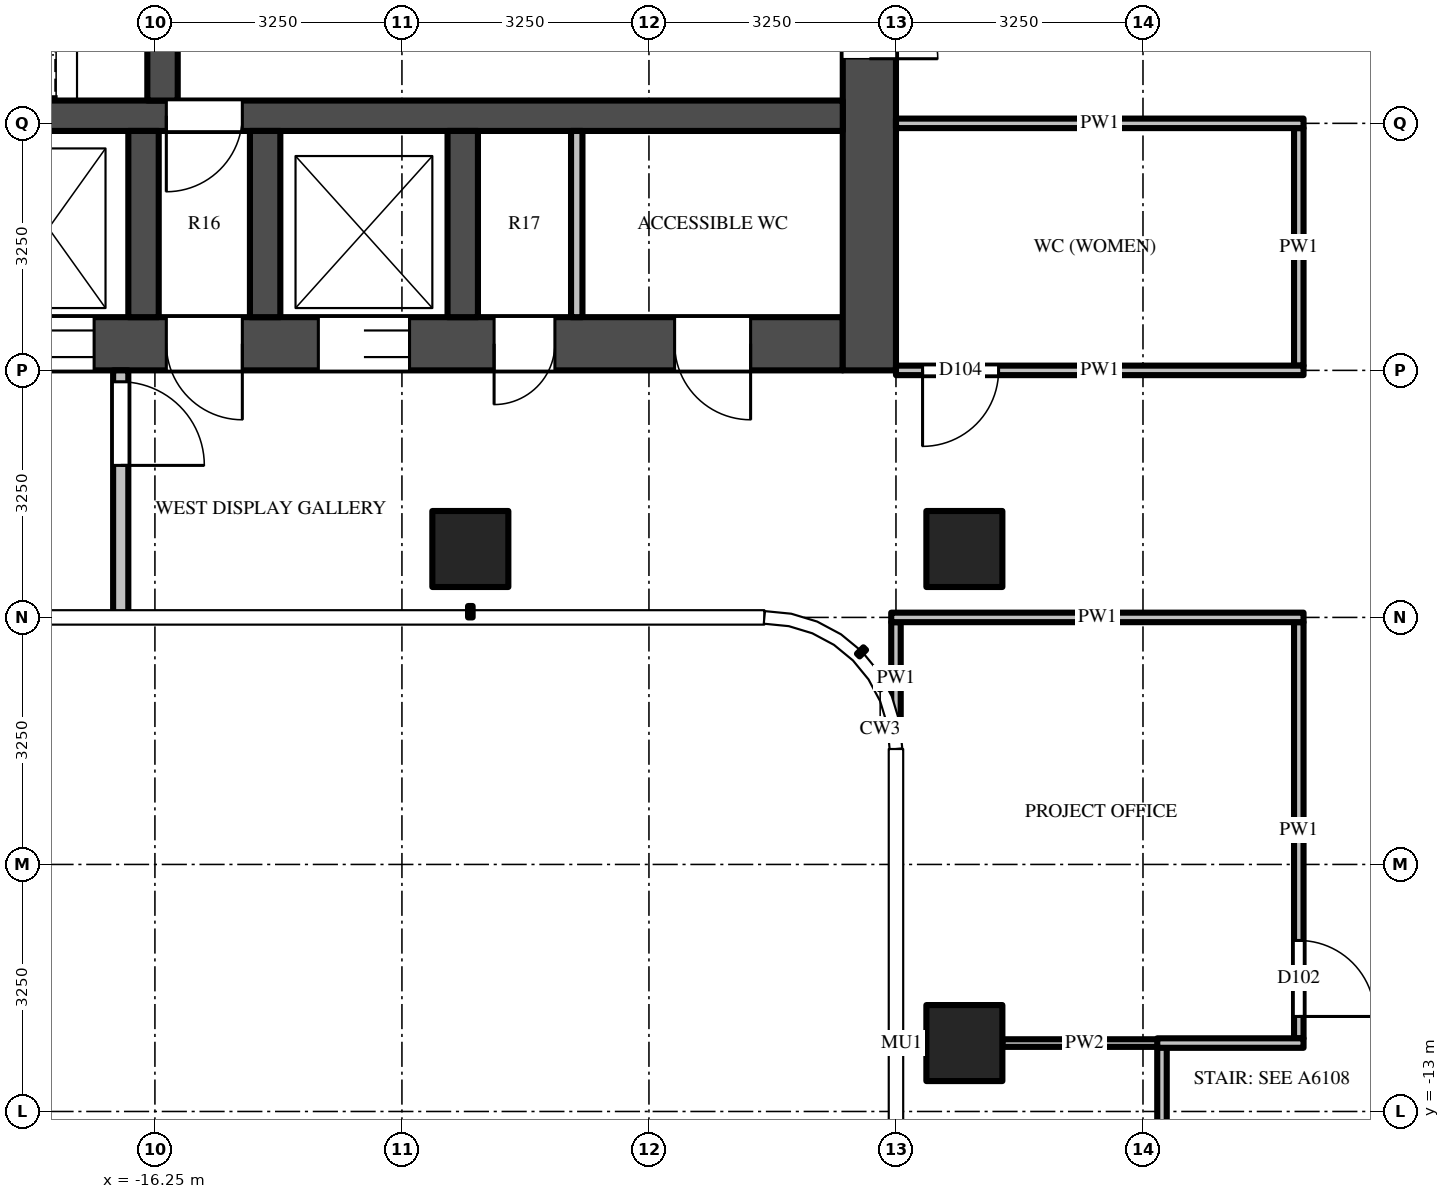
"""IFC4 building model, lengths in metres.
Left out: names, types, materials, properties, quantities, classifications, styles, units other than length and angle.
Written with IfcOpenShell. Run it as: python <this file> out.ifc"""

import sys

from ifc_helpers import new_model, si_unit, direction, frame, frame_2d, origin, origin_2d, place, context, subcontext, project, spatial, rectangle, extrude, source, transform, mapped, element, fill, save


model = new_model("IFC4")
c1 = context("Model", 3, precision=1e-05, world=origin(), true_north=direction((0.0, 1.0)))
c2 = subcontext(c1, "Body", "Model", "MODEL_VIEW")
j1 = project(units=[si_unit("LENGTHUNIT", "METRE"), si_unit("PLANEANGLEUNIT", "RADIAN")], contexts=[c1])
p1 = place(None, origin())
s1 = spatial("IfcSite", under=j1, at=p1, CompositionType="ELEMENT")
p2 = place(p1, origin())
s2 = spatial("IfcBuilding", under=s1, at=p2, CompositionType="ELEMENT")
p3 = place(p2, frame((0.0, 0.0, 326.2)))
s3 = spatial("IfcBuildingStorey", under=s2, at=p3, CompositionType="ELEMENT", Elevation=326.2)
m1 = source(origin(), c2, "Body", "SweptSolid", [
    extrude(rectangle(XDim=1.0, YDim=1.0, at=origin_2d()), origin(), (0.0, 0.0, 1.0), 3.9),
])
for number, where, z_axis, x_axis in (
    (1, (-5.6, -5.6, 0.0), (0.0, 0.0, 1.0), (1.0, 0.0, 0.0)),
    (2, (-5.6, -12.1, 0.0), (0.0, 0.0, 1.0), (1.0, 0.0, 0.0)),
    (3, (-12.1, -5.6, 0.0), (0.0, 0.0, 1.0), (1.0, 0.0, 0.0)),
):
    element("IfcColumn", number, at=place(p3, frame(where, z_axis=z_axis, x_axis=x_axis)), inside=s3, PredefinedType="COLUMN", context=c2, shape_type="MappedRepresentation", body=[
        mapped(m1, transform((0.0, 0.0, 0.0))),
    ])
m2 = source(origin(), c2, "Body", "SweptSolid", [
    extrude(rectangle(XDim=14.85, YDim=0.7, at=frame_2d((7.425, 0.0))), origin(), (0.0, 0.0, 1.0), 3.5),
])
p4 = place(p3, frame((-7.2, -2.9, 0.0), z_axis=(0.0, 0.0, 1.0), x_axis=(-1.0, 0.0, 0.0)))
e4 = element("IfcWall", 4, at=p4, inside=s3, PredefinedType="SHEAR", context=c2, shape_type="MappedRepresentation", body=[
    mapped(m2, transform((0.0, 0.0, 0.0))),
])
m3 = source(origin(), c2, "Body", "SweptSolid", [
    extrude(rectangle(XDim=1.2, YDim=2.1, at=frame_2d((0.6, 1.05))), frame((0.0, 0.36, 0.0), z_axis=(0.0, -1.0, 0.0), x_axis=(1.0, 0.0, 0.0)), (0.0, 0.0, 1.0), 0.72),
])
p5 = place(p4, frame((5.7, 0.0, 0.0)))
e5 = element("IfcOpeningElement", 5, at=p5, cuts=e4, PredefinedType="OPENING", context=c2, shape_type="MappedRepresentation", body=[
    mapped(m3, transform((0.0, 0.0, 0.0))),
])
m4 = source(origin(), c2, "Body", "SweptSolid", [
    extrude(rectangle(XDim=1.3, YDim=2.1, at=frame_2d((0.65, 1.05))), frame((0.0, 0.36, 0.0), z_axis=(0.0, -1.0, 0.0), x_axis=(1.0, 0.0, 0.0)), (0.0, 0.0, 1.0), 0.72),
])
p6 = place(p4, frame((12.2, 0.0, 0.0)))
e6 = element("IfcOpeningElement", 6, at=p6, cuts=e4, PredefinedType="OPENING", context=c2, shape_type="MappedRepresentation", body=[
    mapped(m4, transform((0.0, 0.0, 0.0))),
])
p7 = place(p4, frame((9.85, 0.0, 0.0)))
e7 = element("IfcOpeningElement", 7, at=p7, cuts=e4, PredefinedType="OPENING", context=c2, shape_type="MappedRepresentation", body=[
    mapped(m3, transform((0.0, 0.0, 0.0))),
])
m5 = source(origin(), c2, "Body", "SweptSolid", [
    extrude(rectangle(XDim=1.0, YDim=2.1, at=frame_2d((0.5, 1.05))), frame((0.0, 0.36, 0.0), z_axis=(0.0, -1.0, 0.0), x_axis=(1.0, 0.0, 0.0)), (0.0, 0.0, 1.0), 0.72),
])
p8 = place(p4, frame((7.9, 0.0, 0.0)))
e8 = element("IfcOpeningElement", 8, at=p8, cuts=e4, PredefinedType="OPENING", context=c2, shape_type="MappedRepresentation", body=[
    mapped(m5, transform((0.0, 0.0, 0.0))),
])
p9 = place(p4, frame((1.212, 0.0, 0.0)))
e9 = element("IfcOpeningElement", 9, at=p9, cuts=e4, PredefinedType="OPENING", context=c2, shape_type="MappedRepresentation", body=[
    mapped(m5, transform((0.0, 0.0, 0.0))),
])
m6 = source(origin(), c2, "Body", "SweptSolid", [
    extrude(rectangle(XDim=0.8, YDim=2.1, at=frame_2d((0.4, 1.05))), frame((0.0, 0.36, 0.0), z_axis=(0.0, -1.0, 0.0), x_axis=(1.0, 0.0, 0.0)), (0.0, 0.0, 1.0), 0.72),
])
p10 = place(p4, frame((3.788, 0.0, 0.0)))
e10 = element("IfcOpeningElement", 10, at=p10, cuts=e4, PredefinedType="OPENING", context=c2, shape_type="MappedRepresentation", body=[
    mapped(m6, transform((0.0, 0.0, 0.0))),
])
m7 = source(origin(), c2, "Body", "SweptSolid", [
    extrude(rectangle(XDim=9.05, YDim=0.7, at=frame_2d((4.525, 0.0))), origin(), (0.0, 0.0, 1.0), 3.5),
])
p11 = place(p3, frame((-6.85, 5.8, 0.0), z_axis=(0.0, 0.0, 1.0), x_axis=(0.0, -1.0, 0.0)))
e11 = element("IfcWall", 11, at=p11, inside=s3, PredefinedType="SHEAR", context=c2, shape_type="MappedRepresentation", body=[
    mapped(m7, transform((0.0, 0.0, 0.0))),
])
m8 = source(origin(), c2, "Body", "SweptSolid", [
    extrude(rectangle(XDim=1.8, YDim=2.1, at=frame_2d((0.9, 1.05))), frame((0.0, 0.36, 0.0), z_axis=(0.0, -1.0, 0.0), x_axis=(1.0, 0.0, 0.0)), (0.0, 0.0, 1.0), 0.72),
])
p12 = place(p11, frame((3.15, 0.0, 0.0)))
e12 = element("IfcOpeningElement", 12, at=p12, cuts=e11, PredefinedType="OPENING", context=c2, shape_type="MappedRepresentation", body=[
    mapped(m8, transform((0.0, 0.0, 0.0))),
])
m9 = source(origin(), c2, "Body", "SweptSolid", [
    extrude(rectangle(XDim=14.85, YDim=0.4, at=frame_2d((7.425, 0.0))), origin(), (0.0, 0.0, 1.0), 3.5),
])
p13 = place(p3, frame((-7.2, 0.1, 0.0), z_axis=(0.0, 0.0, 1.0), x_axis=(-1.0, 0.0, 0.0)))
e13 = element("IfcWall", 13, at=p13, inside=s3, PredefinedType="SHEAR", context=c2, shape_type="MappedRepresentation", body=[
    mapped(m9, transform((0.0, 0.0, 0.0))),
])
m10 = source(origin(), c2, "Body", "SweptSolid", [
    extrude(rectangle(XDim=1.0, YDim=2.1, at=frame_2d((0.5, 1.05))), frame((0.0, 0.21, 0.0), z_axis=(0.0, -1.0, 0.0), x_axis=(1.0, 0.0, 0.0)), (0.0, 0.0, 1.0), 0.42),
])
p14 = place(p13, frame((7.9, 0.0, 0.0)))
e14 = element("IfcOpeningElement", 14, at=p14, cuts=e13, PredefinedType="OPENING", context=c2, shape_type="MappedRepresentation", body=[
    mapped(m10, transform((0.0, 0.0, 0.0))),
])
m11 = source(origin(), c2, "Body", "SweptSolid", [
    extrude(rectangle(XDim=5.5, YDim=0.4, at=frame_2d((2.75, 0.0))), origin(), (0.0, 0.0, 1.0), 3.5),
])
p15 = place(p3, frame((-16.15, 5.8, 0.0), z_axis=(0.0, 0.0, 1.0), x_axis=(0.0, -1.0, 0.0)))
e15 = element("IfcWall", 15, at=p15, inside=s3, PredefinedType="SHEAR", context=c2, shape_type="MappedRepresentation", body=[
    mapped(m11, transform((0.0, 0.0, 0.0))),
])
m12 = source(origin(), c2, "Body", "SweptSolid", [
    extrude(rectangle(XDim=1.1, YDim=2.1, at=frame_2d((0.55, 1.05))), frame((0.0, 0.21, 0.0), z_axis=(0.0, -1.0, 0.0), x_axis=(1.0, 0.0, 0.0)), (0.0, 0.0, 1.0), 0.42),
])
p16 = place(p15, frame((0.725, 0.0, 0.0)))
e16 = element("IfcOpeningElement", 16, at=p16, cuts=e15, PredefinedType="OPENING", context=c2, shape_type="MappedRepresentation", body=[
    mapped(m12, transform((0.0, 0.0, 0.0))),
])
p17 = place(p15, frame((3.675, 0.0, 0.0)))
e17 = element("IfcOpeningElement", 17, at=p17, cuts=e15, PredefinedType="OPENING", context=c2, shape_type="MappedRepresentation", body=[
    mapped(m12, transform((0.0, 0.0, 0.0))),
])
m13 = source(origin(), c2, "Body", "SweptSolid", [
    extrude(rectangle(XDim=2.45, YDim=0.4, at=frame_2d((1.225, 0.0))), origin(), (0.0, 0.0, 1.0), 3.5),
])
for number, where, z_axis, x_axis in (
    (18, (-12.2, -0.1, 0.0), (0.0, 0.0, 1.0), (0.0, -1.0, 0.0)),
    (19, (-14.8, -0.1, 0.0), (0.0, 0.0, 1.0), (0.0, -1.0, 0.0)),
    (20, (-16.4, -0.1, 0.0), (0.0, 0.0, 1.0), (0.0, -1.0, 0.0)),
):
    element("IfcWall", number, at=place(p3, frame(where, z_axis=z_axis, x_axis=x_axis)), inside=s3, PredefinedType="SHEAR", context=c2, shape_type="MappedRepresentation", body=[
        mapped(m13, transform((0.0, 0.0, 0.0))),
    ])
m14 = source(origin(), c2, "Body", "SweptSolid", [
    extrude(rectangle(XDim=3.25, YDim=0.2, at=frame_2d((1.625, 0.0))), origin(), (0.0, 0.0, 1.0), 3.5),
])
p18 = place(p3, frame((-16.7, -3.25, 0.0), z_axis=(0.0, 0.0, 1.0), x_axis=(0.0, -1.0, 0.0)))
e21 = element("IfcWall", 21, at=p18, inside=s3, PredefinedType="PARTITIONING", context=c2, shape_type="MappedRepresentation", body=[
    mapped(m14, transform((0.0, 0.0, 0.0))),
])
m15 = source(origin(), c2, "Body", "SweptSolid", [
    extrude(rectangle(XDim=1.1, YDim=2.1, at=frame_2d((0.55, 1.05))), frame((0.0, 0.11, 0.0), z_axis=(0.0, -1.0, 0.0), x_axis=(1.0, 0.0, 0.0)), (0.0, 0.0, 1.0), 0.22),
])
p19 = place(p18, frame((0.15, 0.0, 0.0)))
e22 = element("IfcOpeningElement", 22, at=p19, cuts=e21, PredefinedType="OPENING", context=c2, shape_type="MappedRepresentation", body=[
    mapped(m15, transform((0.0, 0.0, 0.0))),
])
m16 = source(origin(), c2, "Body", "SweptSolid", [
    extrude(rectangle(XDim=2.45, YDim=0.15, at=frame_2d((1.225, 0.0))), origin(), (0.0, 0.0, 1.0), 3.5),
])
p20 = place(p3, frame((-10.7, -0.1, 0.0), z_axis=(0.0, 0.0, 1.0), x_axis=(0.0, -1.0, 0.0)))
e23 = element("IfcWall", 23, at=p20, inside=s3, PredefinedType="PARTITIONING", context=c2, shape_type="MappedRepresentation", body=[
    mapped(m16, transform((0.0, 0.0, 0.0))),
])
m17 = source(origin(), c2, "Body", "SweptSolid", [
    extrude(rectangle(XDim=1.469, YDim=0.125, at=frame_2d((0.734, 0.0))), origin(), (0.0, 0.0, 1.0), 3.5),
])
p21 = place(p3, frame((-6.5, -6.562, 0.0), z_axis=(0.0, 0.0, 1.0), x_axis=(0.0, -1.0, 0.0)))
e24 = element("IfcWall", 24, at=p21, inside=s3, PredefinedType="PARTITIONING", context=c2, shape_type="MappedRepresentation", body=[
    mapped(m17, transform((0.0, 0.0, 0.0))),
])
m18 = source(origin(), c2, "Body", "SweptSolid", [
    extrude(rectangle(XDim=8.788, YDim=0.125, at=frame_2d((4.394, 0.0))), origin(), (0.0, 0.0, 1.0), 2.58),
])
p22 = place(p3, frame((-3.0, -20.938, 0.0), z_axis=(0.0, 0.0, 1.0), x_axis=(0.0, 1.0, 0.0)))
e25 = element("IfcWall", 25, at=p22, inside=s3, PredefinedType="PARTITIONING", context=c2, shape_type="MappedRepresentation", body=[
    mapped(m18, transform((0.0, 0.0, 0.0))),
])
m19 = source(origin(), c2, "Body", "SweptSolid", [
    extrude(rectangle(XDim=1.8, YDim=2.1, at=frame_2d((0.9, 1.05))), frame((0.0, 0.073, 0.0), z_axis=(0.0, -1.0, 0.0), x_axis=(1.0, 0.0, 0.0)), (0.0, 0.0, 1.0), 0.145),
])
p23 = place(p22, frame((5.288, 0.0, 0.0)))
e26 = element("IfcOpeningElement", 26, at=p23, cuts=e25, PredefinedType="OPENING", context=c2, shape_type="MappedRepresentation", body=[
    mapped(m19, transform((0.0, 0.0, 0.0))),
])
m20 = source(origin(), c2, "Body", "SweptSolid", [
    extrude(rectangle(XDim=5.475, YDim=0.125, at=frame_2d((2.738, 0.0))), origin(), (0.0, 0.0, 1.0), 2.718),
])
p24 = place(p3, frame((-1.2, -6.562, 0.0), z_axis=(0.0, 0.0, 1.0), x_axis=(0.0, -1.0, 0.0)))
e27 = element("IfcWall", 27, at=p24, inside=s3, PredefinedType="PARTITIONING", context=c2, shape_type="MappedRepresentation", body=[
    mapped(m20, transform((0.0, 0.0, 0.0))),
])
m21 = source(origin(), c2, "Body", "SweptSolid", [
    extrude(rectangle(XDim=1.0, YDim=2.1, at=frame_2d((0.5, 1.05))), frame((0.0, 0.073, 0.0), z_axis=(0.0, -1.0, 0.0), x_axis=(1.0, 0.0, 0.0)), (0.0, 0.0, 1.0), 0.145),
])
p25 = place(p24, frame((4.188, 0.0, 0.0)))
e28 = element("IfcOpeningElement", 28, at=p25, cuts=e27, PredefinedType="OPENING", context=c2, shape_type="MappedRepresentation", body=[
    mapped(m21, transform((0.0, 0.0, 0.0))),
])
m22 = source(origin(), c2, "Body", "SweptSolid", [
    extrude(rectangle(XDim=3.125, YDim=0.125, at=frame_2d((1.562, 0.0))), origin(), (0.0, 0.0, 1.0), 2.797),
])
p26 = place(p3, frame((-1.2, -0.062, 0.0), z_axis=(0.0, 0.0, 1.0), x_axis=(0.0, -1.0, 0.0)))
e29 = element("IfcWall", 29, at=p26, inside=s3, PredefinedType="PARTITIONING", context=c2, shape_type="MappedRepresentation", body=[
    mapped(m22, transform((0.0, 0.0, 0.0))),
])
m23 = source(origin(), c2, "Body", "SweptSolid", [
    extrude(rectangle(XDim=2.163, YDim=0.1, at=frame_2d((1.081, 0.0))), origin(), (0.0, 0.0, 1.0), 2.718),
])
p27 = place(p3, frame((-5.1, -12.1, 0.0), z_axis=(0.0, 0.0, 1.0), x_axis=(1.0, 0.0, 0.0)))
e30 = element("IfcWall", 30, at=p27, inside=s3, PredefinedType="PARTITIONING", context=c2, shape_type="MappedRepresentation", body=[
    mapped(m23, transform((0.0, 0.0, 0.0))),
])
m24 = source(origin(), c2, "Body", "SweptSolid", [
    extrude(rectangle(XDim=1.925, YDim=0.125, at=frame_2d((0.962, 0.0))), origin(), (0.0, 0.0, 1.0), 2.718),
])
p28 = place(p3, frame((-3.062, -12.1, 0.0), z_axis=(0.0, 0.0, 1.0), x_axis=(1.0, 0.0, 0.0)))
e31 = element("IfcWall", 31, at=p28, inside=s3, PredefinedType="PARTITIONING", context=c2, shape_type="MappedRepresentation", body=[
    mapped(m24, transform((0.0, 0.0, 0.0))),
])
m25 = source(origin(), c2, "Body", "SweptSolid", [
    extrude(rectangle(XDim=5.425, YDim=0.125, at=frame_2d((2.712, 0.0))), origin(), (0.0, 0.0, 1.0), 2.58),
])
p29 = place(p3, frame((-1.137, -6.5, 0.0), z_axis=(0.0, 0.0, 1.0), x_axis=(-1.0, 0.0, 0.0)))
e32 = element("IfcWall", 32, at=p29, inside=s3, PredefinedType="PARTITIONING", context=c2, shape_type="MappedRepresentation", body=[
    mapped(m25, transform((0.0, 0.0, 0.0))),
])
m26 = source(origin(), c2, "Body", "SweptSolid", [
    extrude(rectangle(XDim=5.363, YDim=0.125, at=frame_2d((2.681, 0.0))), origin(), (0.0, 0.0, 1.0), 2.718),
])
p30 = place(p3, frame((-1.137, -3.25, 0.0), z_axis=(0.0, 0.0, 1.0), x_axis=(-1.0, 0.0, 0.0)))
e33 = element("IfcWall", 33, at=p30, inside=s3, PredefinedType="PARTITIONING", context=c2, shape_type="MappedRepresentation", body=[
    mapped(m26, transform((0.0, 0.0, 0.0))),
])
p31 = place(p30, frame((4.012, 0.0, 0.0)))
e34 = element("IfcOpeningElement", 34, at=p31, cuts=e33, PredefinedType="OPENING", context=c2, shape_type="MappedRepresentation", body=[
    mapped(m21, transform((0.0, 0.0, 0.0))),
])
p32 = place(p3, frame((-1.137, 0.0, 0.0), z_axis=(0.0, 0.0, 1.0), x_axis=(-1.0, 0.0, 0.0)))
e35 = element("IfcWall", 35, at=p32, inside=s3, PredefinedType="PARTITIONING", context=c2, shape_type="MappedRepresentation", body=[
    mapped(m26, transform((0.0, 0.0, 0.0))),
])
m27 = source(origin(), c2, "Body", "SweptSolid", [
    extrude(rectangle(XDim=1.2, YDim=2.1, at=frame_2d((0.6, 1.05))), frame((0.0, -0.275, 0.0), z_axis=(0.0, -1.0, 0.0), x_axis=(1.0, 0.0, 0.0)), (0.0, 0.0, 1.0), 0.05),
])
p33 = place(p5, origin())
e36 = element("IfcDoor", 36, at=p33, inside=s3, OperationType="DOUBLE_DOOR_SLIDING", PredefinedType="DOOR", context=c2, shape_type="MappedRepresentation", body=[
    mapped(m27, transform((0.0, 0.0, 0.0))),
])
fill(e5, e36)
p34 = place(p7, origin())
e37 = element("IfcDoor", 37, at=p34, inside=s3, OperationType="DOUBLE_DOOR_SLIDING", PredefinedType="DOOR", context=c2, shape_type="MappedRepresentation", body=[
    mapped(m27, transform((0.0, 0.0, 0.0))),
])
fill(e7, e37)
m28 = source(origin(), c2, "Body", "SweptSolid", [
    extrude(rectangle(XDim=1.8, YDim=2.1, at=frame_2d((0.9, 1.05))), frame((0.0, -0.275, 0.0), z_axis=(0.0, -1.0, 0.0), x_axis=(1.0, 0.0, 0.0)), (0.0, 0.0, 1.0), 0.05),
])
p35 = place(p12, origin())
e38 = element("IfcDoor", 38, at=p35, inside=s3, OperationType="DOUBLE_DOOR_SINGLE_SWING", PredefinedType="DOOR", context=c2, shape_type="MappedRepresentation", body=[
    mapped(m28, transform((0.0, 0.0, 0.0))),
])
fill(e12, e38)
m29 = source(origin(), c2, "Body", "SweptSolid", [
    extrude(rectangle(XDim=1.0, YDim=2.1, at=frame_2d((0.5, 1.05))), frame((0.0, 0.025, 0.0), z_axis=(0.0, -1.0, 0.0), x_axis=(1.0, 0.0, 0.0)), (0.0, 0.0, 1.0), 0.05),
])
p36 = place(p14, origin())
e39 = element("IfcDoor", 39, at=p36, inside=s3, OperationType="SINGLE_SWING_RIGHT", PredefinedType="DOOR", context=c2, shape_type="MappedRepresentation", body=[
    mapped(m29, transform((0.0, 0.0, 0.0))),
])
fill(e14, e39)
m30 = source(origin(), c2, "Body", "SweptSolid", [
    extrude(rectangle(XDim=1.0, YDim=2.1, at=frame_2d((0.5, 1.05))), frame((0.0, -0.275, 0.0), z_axis=(0.0, -1.0, 0.0), x_axis=(1.0, 0.0, 0.0)), (0.0, 0.0, 1.0), 0.05),
])
p37 = place(p8, origin())
e40 = element("IfcDoor", 40, at=p37, inside=s3, OperationType="SINGLE_SWING_LEFT", PredefinedType="DOOR", context=c2, shape_type="MappedRepresentation", body=[
    mapped(m30, transform((0.0, 0.0, 0.0))),
])
fill(e8, e40)
m31 = source(origin(), c2, "Body", "SweptSolid", [
    extrude(rectangle(XDim=1.1, YDim=2.1, at=frame_2d((0.55, 1.05))), frame((0.0, 0.025, 0.0), z_axis=(0.0, -1.0, 0.0), x_axis=(1.0, 0.0, 0.0)), (0.0, 0.0, 1.0), 0.05),
])
p38 = place(p19, origin())
e41 = element("IfcDoor", 41, at=p38, inside=s3, OperationType="SINGLE_SWING_RIGHT", PredefinedType="DOOR", context=c2, shape_type="MappedRepresentation", body=[
    mapped(m31, transform((0.0, 0.0, 0.0))),
])
fill(e22, e41)
p39 = place(p9, origin())
e42 = element("IfcDoor", 42, at=p39, inside=s3, OperationType="SINGLE_SWING_LEFT", PredefinedType="DOOR", context=c2, shape_type="MappedRepresentation", body=[
    mapped(m30, transform((0.0, 0.0, 0.0))),
])
fill(e9, e42)
m32 = source(origin(), c2, "Body", "SweptSolid", [
    extrude(rectangle(XDim=0.8, YDim=2.1, at=frame_2d((0.4, 1.05))), frame((0.0, -0.275, 0.0), z_axis=(0.0, -1.0, 0.0), x_axis=(1.0, 0.0, 0.0)), (0.0, 0.0, 1.0), 0.05),
])
p40 = place(p10, origin())
e43 = element("IfcDoor", 43, at=p40, inside=s3, OperationType="SINGLE_SWING_RIGHT", PredefinedType="DOOR", context=c2, shape_type="MappedRepresentation", body=[
    mapped(m32, transform((0.0, 0.0, 0.0))),
])
fill(e10, e43)
p41 = place(p25, origin())
e44 = element("IfcDoor", 44, at=p41, inside=s3, OperationType="SINGLE_SWING_RIGHT", PredefinedType="DOOR", context=c2, shape_type="MappedRepresentation", body=[
    mapped(m29, transform((0.0, 0.0, 0.0))),
])
fill(e28, e44)
p42 = place(p31, origin())
e45 = element("IfcDoor", 45, at=p42, inside=s3, OperationType="SINGLE_SWING_RIGHT", PredefinedType="DOOR", context=c2, shape_type="MappedRepresentation", body=[
    mapped(m29, transform((0.0, 0.0, 0.0))),
])
fill(e34, e45)
save(model, sys.argv[1])
